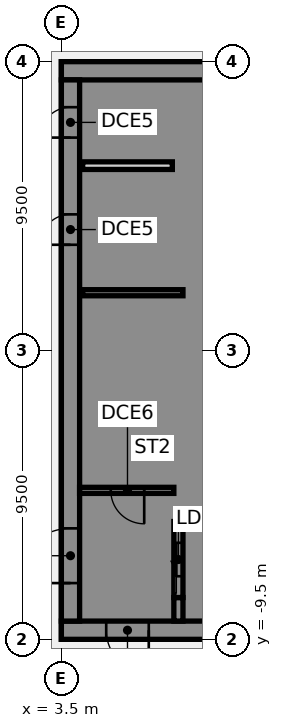
"""IFC4 building model, lengths in metres.
Left out: names, types, materials, properties, quantities, classifications, styles, units other than length and angle.
Written with IfcOpenShell. Run it as: python <this file> out.ifc"""

import sys

from ifc_helpers import new_model, si_unit, direction, frame, frame_2d, origin, place, context, subcontext, project, spatial, polyline, rectangle, outline, extrude, element, fill, save


model = new_model("IFC4")
c1 = context("Model", 3, precision=1e-05, world=origin(), true_north=direction((0.0, 1.0)))
c2 = subcontext(c1, "Body", "Model", "MODEL_VIEW")
j1 = project(units=[si_unit("LENGTHUNIT", "METRE"), si_unit("PLANEANGLEUNIT", "RADIAN")], contexts=[c1])
p1 = place(None, origin())
s1 = spatial("IfcSite", under=j1, at=p1, CompositionType="ELEMENT")
p2 = place(p1, origin())
s2 = spatial("IfcBuilding", under=s1, at=p2, CompositionType="ELEMENT")
p3 = place(p2, frame((0.0, 0.0, 94.75)))
s3 = spatial("IfcBuildingStorey", under=s2, at=p3, CompositionType="ELEMENT", Elevation=94.75)
p4 = place(p3, frame((16.5, -9.2, 0.0), z_axis=(0.0, 0.0, 1.0), x_axis=(-1.0, 0.0, 0.0)))
e1 = element("IfcWall", 1, at=p4, inside=s3, PredefinedType="SHEAR", context=c2, shape_type="SweptSolid", body=[
    extrude(rectangle(XDim=13.0, YDim=0.6, at=frame_2d((6.5, 0.0))), origin(), (0.0, 0.0, 1.0), 3.61),
])
p5 = place(p4, frame((4.15, 0.0, 0.0)))
e2 = element("IfcOpeningElement", 2, at=p5, cuts=e1, PredefinedType="OPENING", context=c2, shape_type="SweptSolid", body=[
    extrude(rectangle(XDim=1.4, YDim=2.1, at=frame_2d((0.7, 1.05))), frame((0.0, 0.31, 0.0), z_axis=(0.0, -1.0, 0.0), x_axis=(1.0, 0.0, 0.0)), (0.0, 0.0, 1.0), 0.62),
])
p6 = place(p4, frame((10.125, 0.0, 0.0)))
e3 = element("IfcOpeningElement", 3, at=p6, cuts=e1, PredefinedType="OPENING", context=c2, shape_type="SweptSolid", body=[
    extrude(rectangle(XDim=1.4, YDim=2.1, at=frame_2d((0.7, 1.05))), frame((0.0, 0.31, 0.0), z_axis=(0.0, -1.0, 0.0), x_axis=(1.0, 0.0, 0.0)), (0.0, 0.0, 1.0), 0.62),
])
p7 = place(p3, frame((16.5, 9.2, 0.0), z_axis=(0.0, 0.0, 1.0), x_axis=(-1.0, 0.0, 0.0)))
e4 = element("IfcWall", 4, at=p7, inside=s3, PredefinedType="SHEAR", context=c2, shape_type="SweptSolid", body=[
    extrude(rectangle(XDim=13.0, YDim=0.6, at=frame_2d((6.5, 0.0))), origin(), (0.0, 0.0, 1.0), 3.61),
])
p8 = place(p3, origin())
e5 = element("IfcWall", 5, at=p8, inside=s3, PredefinedType="SHEAR", context=c2, shape_type="SweptSolid", body=[
    extrude(outline(polyline([(9.8, -5.375), (7.5, -5.375), (7.5, -2.875), (9.8, -2.875), (9.8, -2.625), (7.5, -2.625), (7.5, -0.125), (9.8, -0.125), (9.8, 0.125), (7.5, 0.125), (7.5, 2.625), (9.8, 2.625), (9.8, 2.875), (7.5, 2.875), (7.5, 5.375), (9.8, 5.375), (9.8, 5.625), (7.5, 5.625), (7.5, 8.125), (9.8, 8.125), (9.8, 8.9), (7.5, 8.9), (7.2, 8.9), (7.2, -5.625), (7.5, -5.625), (9.8, -5.625), (9.8, -5.375)])), origin(), (0.0, 0.0, 1.0), 3.61),
])
p9 = place(p3, origin())
e6 = element("IfcWall", 6, at=p9, inside=s3, PredefinedType="SHEAR", context=c2, shape_type="SweptSolid", body=[
    extrude(outline(polyline([(7.5, -8.125), (7.5, -8.9), (9.8, -8.9), (9.8, -8.125), (9.8, -5.625), (9.55, -5.625), (9.55, -8.125), (7.5, -8.125)])), origin(), (0.0, 0.0, 1.0), 3.61),
])
p10 = place(p3, frame((7.35, -8.9, 0.0), z_axis=(0.0, 0.0, 1.0), x_axis=(0.0, 1.0, 0.0)))
e7 = element("IfcWall", 7, at=p10, inside=s3, PredefinedType="SHEAR", context=c2, shape_type="SweptSolid", body=[
    extrude(rectangle(XDim=0.775, YDim=0.3, at=frame_2d((0.387, 0.0))), origin(), (0.0, 0.0, 1.0), 3.61),
])
p11 = place(p3, frame((7.5, 1.9, 0.0), z_axis=(0.0, 0.0, 1.0), x_axis=(-1.0, 0.0, 0.0)))
e8 = element("IfcWall", 8, at=p11, inside=s3, PredefinedType="SHEAR", context=c2, shape_type="SweptSolid", body=[
    extrude(rectangle(XDim=3.3, YDim=0.2, at=frame_2d((1.65, 0.0))), origin(), (0.0, 0.0, 1.0), 3.61),
])
p12 = place(p3, frame((7.35, -8.125, 0.0), z_axis=(0.0, 0.0, 1.0), x_axis=(0.0, 1.0, 0.0)))
e9 = element("IfcWall", 9, at=p12, inside=s3, PredefinedType="SHEAR", context=c2, shape_type="SweptSolid", body=[
    extrude(rectangle(XDim=2.5, YDim=0.3, at=frame_2d((1.25, 0.0))), origin(), (0.0, 0.0, 1.0), 3.61),
])
p13 = place(p12, frame((0.7, 0.0, 0.0)))
e10 = element("IfcOpeningElement", 10, at=p13, cuts=e9, PredefinedType="OPENING", context=c2, shape_type="SweptSolid", body=[
    extrude(rectangle(XDim=1.1, YDim=2.1, at=frame_2d((0.55, 1.05))), frame((0.0, 0.16, 0.0), z_axis=(0.0, -1.0, 0.0), x_axis=(1.0, 0.0, 0.0)), (0.0, 0.0, 1.0), 0.32),
])
p14 = place(p3, frame((3.8, -8.9, 0.0), z_axis=(0.0, 0.0, 1.0), x_axis=(0.0, 1.0, 0.0)))
e11 = element("IfcWall", 11, at=p14, inside=s3, PredefinedType="SHEAR", context=c2, shape_type="SweptSolid", body=[
    extrude(rectangle(XDim=17.8, YDim=0.6, at=frame_2d((8.9, 0.0))), origin(), (0.0, 0.0, 1.0), 3.61),
])
p15 = place(p14, frame((1.25, 0.0, 0.0)))
e12 = element("IfcOpeningElement", 12, at=p15, cuts=e11, PredefinedType="OPENING", context=c2, shape_type="SweptSolid", body=[
    extrude(rectangle(XDim=1.8, YDim=2.1, at=frame_2d((0.9, 1.05))), frame((0.0, 0.31, 0.0), z_axis=(0.0, -1.0, 0.0), x_axis=(1.0, 0.0, 0.0)), (0.0, 0.0, 1.0), 0.62),
])
p16 = place(p14, frame((12.377, 0.0, 0.0)))
e13 = element("IfcOpeningElement", 13, at=p16, cuts=e11, PredefinedType="OPENING", context=c2, shape_type="SweptSolid", body=[
    extrude(rectangle(XDim=1.0, YDim=2.1, at=frame_2d((0.5, 1.05))), frame((0.0, 0.31, 0.0), z_axis=(0.0, -1.0, 0.0), x_axis=(1.0, 0.0, 0.0)), (0.0, 0.0, 1.0), 0.62),
])
p17 = place(p14, frame((15.903, 0.0, 0.0)))
e14 = element("IfcOpeningElement", 14, at=p17, cuts=e11, PredefinedType="OPENING", context=c2, shape_type="SweptSolid", body=[
    extrude(rectangle(XDim=1.0, YDim=2.1, at=frame_2d((0.5, 1.05))), frame((0.0, 0.31, 0.0), z_axis=(0.0, -1.0, 0.0), x_axis=(1.0, 0.0, 0.0)), (0.0, 0.0, 1.0), 0.62),
])
p18 = place(p3, frame((7.15, 6.08, 0.0), z_axis=(0.0, 0.0, 1.0), x_axis=(-1.0, 0.0, 0.0)))
e15 = element("IfcWall", 15, at=p18, inside=s3, PredefinedType="PARTITIONING", context=c2, shape_type="SweptSolid", body=[
    extrude(rectangle(XDim=2.95, YDim=0.25, at=frame_2d((1.475, 0.0))), origin(), (0.0, 0.0, 1.0), 3.61),
])
p19 = place(p3, frame((7.2, -4.6, 0.0), z_axis=(0.0, 0.0, 1.0), x_axis=(-1.0, 0.0, 0.0)))
e16 = element("IfcWall", 16, at=p19, inside=s3, PredefinedType="SHEAR", context=c2, shape_type="SweptSolid", body=[
    extrude(rectangle(XDim=3.1, YDim=0.2, at=frame_2d((1.55, 0.0))), origin(), (0.0, 0.0, 1.0), 3.61),
])
p20 = place(p19, frame((0.975, 0.0, 0.0)))
e17 = element("IfcOpeningElement", 17, at=p20, cuts=e16, PredefinedType="OPENING", context=c2, shape_type="SweptSolid", body=[
    extrude(rectangle(XDim=1.1, YDim=2.1, at=frame_2d((0.55, 1.05))), frame((0.0, 0.11, 0.0), z_axis=(0.0, -1.0, 0.0), x_axis=(1.0, 0.0, 0.0)), (0.0, 0.0, 1.0), 0.22),
])
p21 = place(p6, origin())
e18 = element("IfcDoor", 18, at=p21, inside=s3, OperationType="SINGLE_SWING_LEFT", PredefinedType="DOOR", context=c2, shape_type="SweptSolid", body=[
    extrude(rectangle(XDim=1.4, YDim=2.1, at=frame_2d((0.7, 1.05))), frame((0.0, 0.025, 0.0), z_axis=(0.0, -1.0, 0.0), x_axis=(1.0, 0.0, 0.0)), (0.0, 0.0, 1.0), 0.05),
])
fill(e3, e18)
p22 = place(p15, origin())
e19 = element("IfcDoor", 19, at=p22, inside=s3, OperationType="SINGLE_SWING_LEFT", PredefinedType="DOOR", context=c2, shape_type="SweptSolid", body=[
    extrude(rectangle(XDim=1.8, YDim=2.1, at=frame_2d((0.9, 1.05))), frame((0.0, 0.025, 0.0), z_axis=(0.0, -1.0, 0.0), x_axis=(1.0, 0.0, 0.0)), (0.0, 0.0, 1.0), 0.05),
])
fill(e12, e19)
p23 = place(p16, origin())
e20 = element("IfcDoor", 20, at=p23, inside=s3, OperationType="SINGLE_SWING_LEFT", PredefinedType="DOOR", context=c2, shape_type="SweptSolid", body=[
    extrude(rectangle(XDim=1.0, YDim=2.1, at=frame_2d((0.5, 1.05))), frame((0.0, -0.225, 0.0), z_axis=(0.0, -1.0, 0.0), x_axis=(1.0, 0.0, 0.0)), (0.0, 0.0, 1.0), 0.05),
])
fill(e13, e20)
p24 = place(p17, origin())
e21 = element("IfcDoor", 21, at=p24, inside=s3, OperationType="SINGLE_SWING_LEFT", PredefinedType="DOOR", context=c2, shape_type="SweptSolid", body=[
    extrude(rectangle(XDim=1.0, YDim=2.1, at=frame_2d((0.5, 1.05))), frame((0.0, -0.225, 0.0), z_axis=(0.0, -1.0, 0.0), x_axis=(1.0, 0.0, 0.0)), (0.0, 0.0, 1.0), 0.05),
])
fill(e14, e21)
p25 = place(p20, origin())
e22 = element("IfcDoor", 22, at=p25, inside=s3, OperationType="SINGLE_SWING_LEFT", PredefinedType="DOOR", context=c2, shape_type="SweptSolid", body=[
    extrude(rectangle(XDim=1.1, YDim=2.1, at=frame_2d((0.55, 1.05))), frame((0.0, 0.025, 0.0), z_axis=(0.0, -1.0, 0.0), x_axis=(1.0, 0.0, 0.0)), (0.0, 0.0, 1.0), 0.05),
])
fill(e17, e22)
p26 = place(p13, origin())
e23 = element("IfcDoor", 23, at=p26, inside=s3, OperationType="SLIDING_TO_LEFT", PredefinedType="DOOR", context=c2, shape_type="SweptSolid", body=[
    extrude(rectangle(XDim=1.1, YDim=2.1, at=frame_2d((0.55, 1.05))), frame((0.0, 0.025, 0.0), z_axis=(0.0, -1.0, 0.0), x_axis=(1.0, 0.0, 0.0)), (0.0, 0.0, 1.0), 0.05),
])
fill(e10, e23)
save(model, sys.argv[1])
